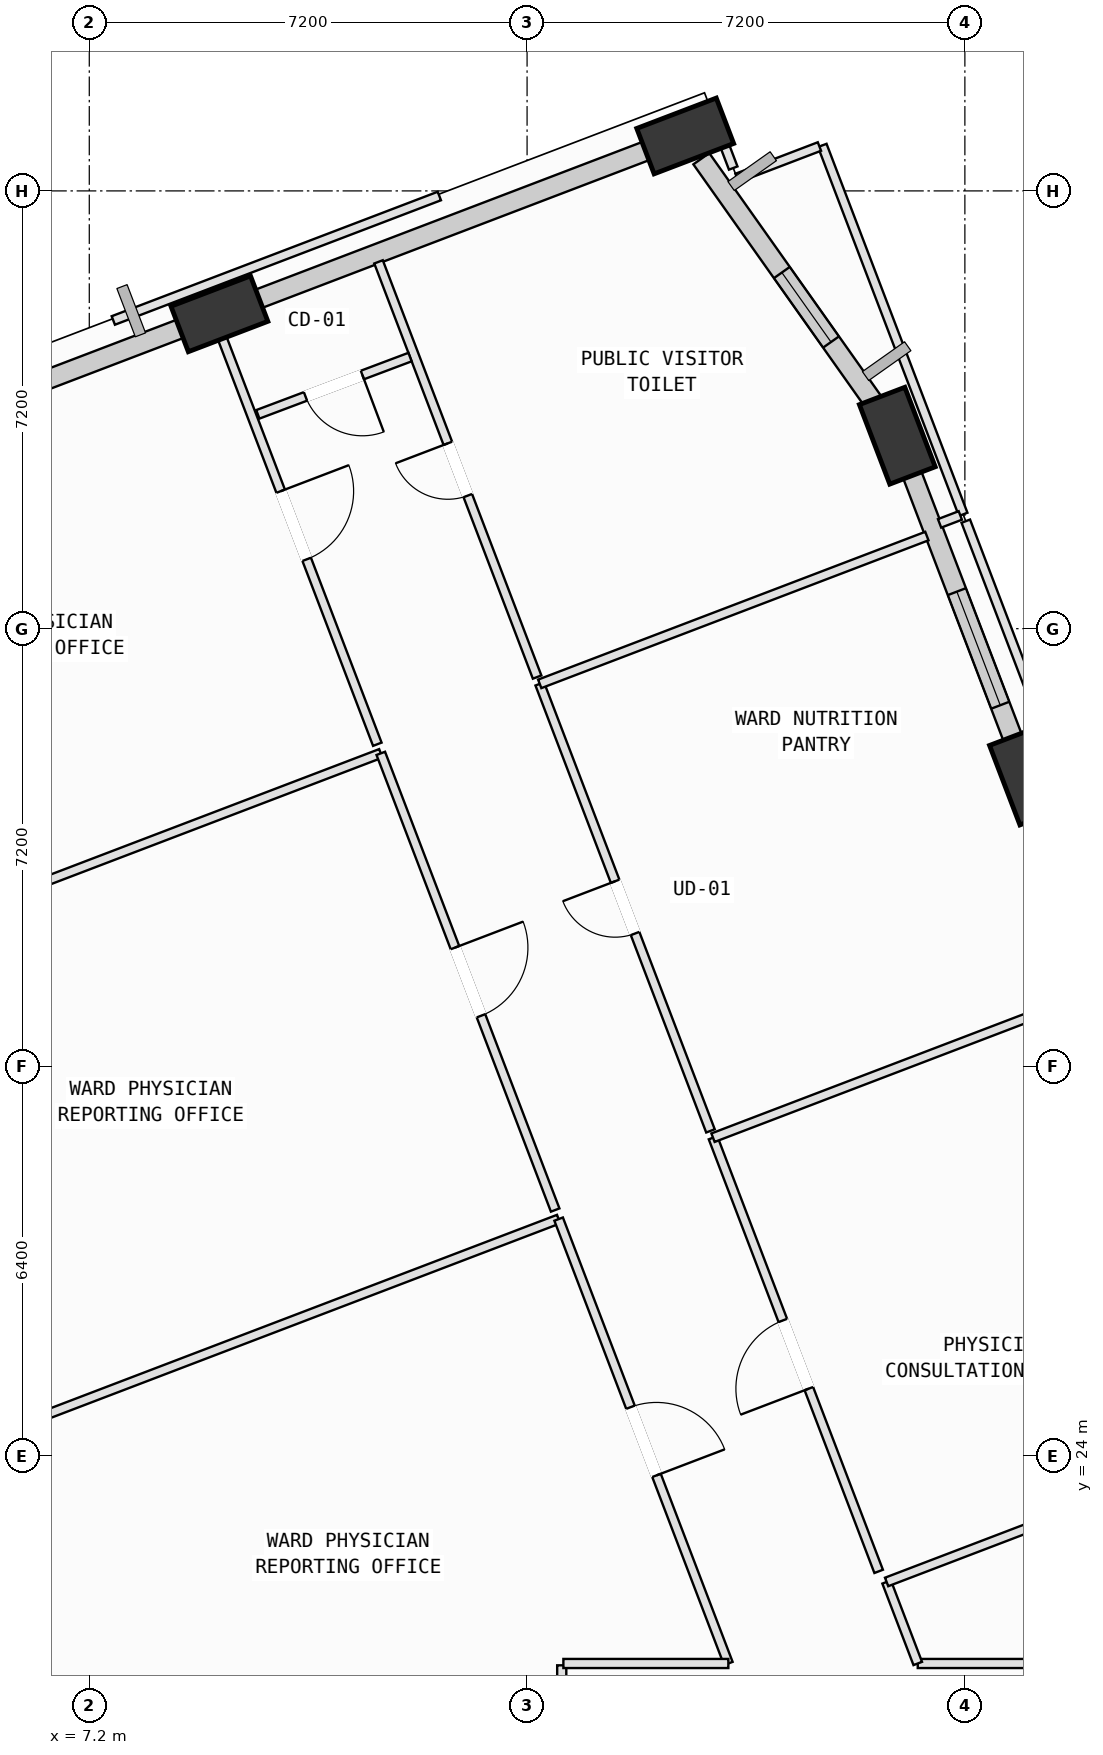
"""IFC4 building model, lengths in metres.
Left out: names, types, materials, properties, quantities, classifications, styles, units other than length and angle.
Written with IfcOpenShell. Run it as: python <this file> out.ifc"""

import sys

from ifc_helpers import new_model, si_unit, direction, frame, frame_2d, origin, origin_2d, place, context, subcontext, project, spatial, rectangle, extrude, element, fill, save


model = new_model("IFC4")
c1 = context("Model", 3, precision=1e-05, world=origin(), true_north=direction((0.0, 1.0)))
c2 = subcontext(c1, "Body", "Model", "MODEL_VIEW")
j1 = project(units=[si_unit("LENGTHUNIT", "METRE"), si_unit("PLANEANGLEUNIT", "RADIAN")], contexts=[c1])
p1 = place(None, origin())
s1 = spatial("IfcSite", under=j1, at=p1, CompositionType="ELEMENT")
p2 = place(p1, origin())
s2 = spatial("IfcBuilding", under=s1, at=p2, CompositionType="ELEMENT")
p3 = place(p2, frame((0.0, 0.0, 112.4)))
s3 = spatial("IfcBuildingStorey", under=s2, at=p3, CompositionType="ELEMENT", Elevation=112.4)
p4 = place(p3, frame((22.629, 35.168, 0.002), z_axis=(-0.042497434841, -0.045728947103, 0.998049513516), x_axis=(0.373403967299, 0.925833824237, 0.058319868861)))
e1 = element("IfcColumn", 1, at=p4, inside=s3, PredefinedType="COLUMN", context=c2, shape_type="SweptSolid", body=[
    extrude(rectangle(XDim=1.4, YDim=0.8, at=origin_2d()), origin(), (0.0, 0.0, 1.0), 4.004),
])
p5 = place(p3, frame((20.489, 40.774, 0.002), z_axis=(-0.065494174518, -0.054720504546, 0.996351433725), x_axis=(0.485566626564, 0.870556249889, 0.079729962663)))
e2 = element("IfcColumn", 2, at=p5, inside=s3, PredefinedType="COLUMN", context=c2, shape_type="SweptSolid", body=[
    extrude(rectangle(XDim=1.4, YDim=0.8, at=origin_2d()), origin(), (0.0, 0.0, 1.0), 4.011),
])
p6 = place(p3, frame((17.0, 45.704, 0.002), z_axis=(-0.08555522656, -0.06909996297, 0.993934353127), x_axis=(0.86282484586, -0.503978288116, 0.039232263177)))
e3 = element("IfcColumn", 3, at=p6, inside=s3, PredefinedType="COLUMN", context=c2, shape_type="SweptSolid", body=[
    extrude(rectangle(XDim=1.4, YDim=0.8, at=origin_2d()), origin(), (0.0, 0.0, 1.0), 4.021),
])
p7 = place(p3, frame((9.34, 42.778, 0.002), z_axis=(-0.07310555409, -0.100383745915, 0.992259382176), x_axis=(0.963553675807, -0.263821466154, 0.044300652763)))
e4 = element("IfcColumn", 4, at=p7, inside=s3, PredefinedType="COLUMN", context=c2, shape_type="SweptSolid", body=[
    extrude(rectangle(XDim=1.4, YDim=0.8, at=origin_2d()), origin(), (0.0, 0.0, 1.0), 4.028),
])
p8 = place(p3, frame((20.676, 40.284, 0.0), z_axis=(0.0, 0.0, 1.0), x_axis=(0.356741479656, -0.934203145302, 0.0)))
e5 = element("IfcWall", 5, at=p8, inside=s3, PredefinedType="SOLIDWALL", context=c2, shape_type="SweptSolid", body=[
    extrude(rectangle(XDim=5.047, YDim=0.32, at=frame_2d((2.523, 0.0))), origin(), (0.0, 0.0, 1.0), 3.165),
])
p9 = place(p8, frame((2.221, 0.0, 0.75)))
e6 = element("IfcOpeningElement", 6, at=p9, cuts=e5, PredefinedType="OPENING", context=c2, shape_type="SweptSolid", body=[
    extrude(rectangle(XDim=2.0, YDim=1.95, at=frame_2d((1.0, 0.975))), frame((0.0, 0.17, 0.0), z_axis=(0.0, -1.0, 0.0), x_axis=(1.0, 0.0, 0.0)), (0.0, 0.0, 1.0), 0.34),
])
p10 = place(p3, frame((17.265, 45.33, 0.0), z_axis=(0.0, 0.0, 1.0), x_axis=(0.577621035299, -0.816305053017, 0.0)))
e7 = element("IfcWall", 7, at=p10, inside=s3, PredefinedType="SOLIDWALL", context=c2, shape_type="SweptSolid", body=[
    extrude(rectangle(XDim=5.129, YDim=0.32, at=frame_2d((2.564, 0.0))), origin(), (0.0, 0.0, 1.0), 3.165),
])
p11 = place(p10, frame((2.293, 0.0, 0.75)))
e8 = element("IfcOpeningElement", 8, at=p11, cuts=e7, PredefinedType="OPENING", context=c2, shape_type="SweptSolid", body=[
    extrude(rectangle(XDim=1.4, YDim=1.85, at=frame_2d((0.7, 0.925))), frame((0.0, 0.17, 0.0), z_axis=(0.0, -1.0, 0.0), x_axis=(1.0, 0.0, 0.0)), (0.0, 0.0, 1.0), 0.34),
])
p12 = place(p3, frame((9.59, 42.874, 0.0), z_axis=(0.0, 0.0, 1.0), x_axis=(0.934201815153, 0.356744962915, 0.0)))
e9 = element("IfcWall", 9, at=p12, inside=s3, PredefinedType="SOLIDWALL", context=c2, shape_type="SweptSolid", body=[
    extrude(rectangle(XDim=7.231, YDim=0.32, at=frame_2d((3.615, 0.0))), origin(), (0.0, 0.0, 1.0), 3.165),
])
p13 = place(p3, frame((1.906, 39.94, 0.0), z_axis=(0.0, 0.0, 1.0), x_axis=(0.934209230199, 0.356725544658, 0.0)))
e10 = element("IfcWall", 10, at=p13, inside=s3, PredefinedType="SOLIDWALL", context=c2, shape_type="SweptSolid", body=[
    extrude(rectangle(XDim=7.27, YDim=0.32, at=frame_2d((3.635, 0.0))), origin(), (0.0, 0.0, 1.0), 3.165),
])
p14 = place(p3, frame((7.165, 17.08, 0.0), z_axis=(0.0, 0.0, 1.0), x_axis=(-0.356759039151, 0.934196439719, 0.0)))
e11 = element("IfcWall", 11, at=p14, inside=s3, PredefinedType="SOLIDWALL", context=c2, shape_type="SweptSolid", body=[
    extrude(rectangle(XDim=5.662, YDim=0.32, at=frame_2d((2.831, 0.0))), origin(), (0.0, 0.0, 1.0), 3.165),
])
p15 = place(p14, frame((1.93, 0.0, 0.75)))
e12 = element("IfcOpeningElement", 12, at=p15, cuts=e11, PredefinedType="OPENING", context=c2, shape_type="SweptSolid", body=[
    extrude(rectangle(XDim=1.8, YDim=2.05, at=frame_2d((0.9, 1.025))), frame((0.0, 0.17, 0.0), z_axis=(0.0, -1.0, 0.0), x_axis=(1.0, 0.0, 0.0)), (0.0, 0.0, 1.0), 0.34),
])
p16 = place(p3, frame((14.97, 20.55, 0.0), z_axis=(0.0, 0.0, 1.0), x_axis=(0.0, -1.0, 0.0)))
e13 = element("IfcWall", 13, at=p16, inside=s3, PredefinedType="PARTITIONING", context=c2, shape_type="SweptSolid", body=[
    extrude(rectangle(XDim=1.248, YDim=0.15, at=frame_2d((0.624, 0.0))), origin(), (0.0, 0.0, 1.0), 3.78),
])
p17 = place(p3, frame((4.675, 23.977, 0.0), z_axis=(0.0, 0.0, 1.0), x_axis=(0.934201387947, 0.356746081629, 0.0)))
e14 = element("IfcWall", 14, at=p17, inside=s3, PredefinedType="PARTITIONING", context=c2, shape_type="SweptSolid", body=[
    extrude(rectangle(XDim=10.965, YDim=0.15, at=frame_2d((5.483, 0.0))), origin(), (0.0, 0.0, 1.0), 3.78),
])
p18 = place(p3, frame((14.919, 27.889, 0.0), z_axis=(0.0, 0.0, 1.0), x_axis=(0.356742665593, -0.934202692431, 0.0)))
e15 = element("IfcWall", 15, at=p18, inside=s3, PredefinedType="PARTITIONING", context=c2, shape_type="SweptSolid", body=[
    extrude(rectangle(XDim=7.824, YDim=0.15, at=frame_2d((3.912, 0.0))), origin(), (0.0, 0.0, 1.0), 3.78),
])
p19 = place(p18, frame((3.312, 0.0, 0.0)))
e16 = element("IfcOpeningElement", 16, at=p19, cuts=e15, PredefinedType="OPENING", context=c2, shape_type="SweptSolid", body=[
    extrude(rectangle(XDim=1.2, YDim=2.15, at=frame_2d((0.6, 1.075))), frame((0.0, 0.085, 0.0), z_axis=(0.0, -1.0, 0.0), x_axis=(1.0, 0.0, 0.0)), (0.0, 0.0, 1.0), 0.17),
])
p20 = place(p3, frame((17.71, 20.58, 0.0), z_axis=(0.0, 0.0, 1.0), x_axis=(-1.0, 0.0, 0.0)))
e17 = element("IfcWall", 17, at=p20, inside=s3, PredefinedType="PARTITIONING", context=c2, shape_type="SweptSolid", body=[
    extrude(rectangle(XDim=2.713, YDim=0.15, at=frame_2d((1.356, 0.0))), origin(), (0.0, 0.0, 1.0), 3.78),
])
p21 = place(p3, frame((1.75, 31.638, 0.0), z_axis=(0.0, 0.0, 1.0), x_axis=(0.934223647232, 0.356687786379, 0.0)))
e18 = element("IfcWall", 18, at=p21, inside=s3, PredefinedType="PARTITIONING", context=c2, shape_type="SweptSolid", body=[
    extrude(rectangle(XDim=10.965, YDim=0.15, at=frame_2d((5.482, 0.0))), origin(), (0.0, 0.0, 1.0), 3.78),
])
p22 = place(p3, frame((11.994, 35.549, 0.0), z_axis=(0.0, 0.0, 1.0), x_axis=(0.356737704726, -0.934204586815, 0.0)))
e19 = element("IfcWall", 19, at=p22, inside=s3, PredefinedType="PARTITIONING", context=c2, shape_type="SweptSolid", body=[
    extrude(rectangle(XDim=8.04, YDim=0.15, at=frame_2d((4.02, 0.0))), origin(), (0.0, 0.0, 1.0), 3.78),
])
p23 = place(p22, frame((3.42, 0.0, 0.0)))
e20 = element("IfcOpeningElement", 20, at=p23, cuts=e19, PredefinedType="OPENING", context=c2, shape_type="SweptSolid", body=[
    extrude(rectangle(XDim=1.2, YDim=2.15, at=frame_2d((0.6, 1.075))), frame((0.0, 0.085, 0.0), z_axis=(0.0, -1.0, 0.0), x_axis=(1.0, 0.0, 0.0)), (0.0, 0.0, 1.0), 0.17),
])
p24 = place(p3, frame((8.638, 42.693, 0.0), z_axis=(0.0, 0.0, 1.0), x_axis=(0.934382200131, 0.356272233101, 0.0)))
e21 = element("IfcWall", 21, at=p24, inside=s3, PredefinedType="PARTITIONING", context=c2, shape_type="SweptSolid", body=[
    extrude(rectangle(XDim=0.587, YDim=0.15, at=frame_2d((0.293, 0.0))), origin(), (0.0, 0.0, 1.0), 3.78),
])
p25 = place(p3, frame((9.186, 42.902, 0.0), z_axis=(0.0, 0.0, 1.0), x_axis=(0.356779945652, -0.934188455495, 0.0)))
e22 = element("IfcWall", 22, at=p25, inside=s3, PredefinedType="PARTITIONING", context=c2, shape_type="SweptSolid", body=[
    extrude(rectangle(XDim=7.71, YDim=0.15, at=frame_2d((3.855, 0.0))), origin(), (0.0, 0.0, 1.0), 2.965),
])
p26 = place(p25, frame((3.255, 0.0, 0.0)))
e23 = element("IfcOpeningElement", 23, at=p26, cuts=e22, PredefinedType="OPENING", context=c2, shape_type="SweptSolid", body=[
    extrude(rectangle(XDim=1.2, YDim=2.15, at=frame_2d((0.6, 1.075))), frame((0.0, 0.085, 0.0), z_axis=(0.0, -1.0, 0.0), x_axis=(1.0, 0.0, 0.0)), (0.0, 0.0, 1.0), 0.17),
])
p27 = place(p3, frame((27.377, 20.58, 0.0), z_axis=(0.0, 0.0, 1.0), x_axis=(-1.0, 0.0, 0.0)))
e24 = element("IfcWall", 24, at=p27, inside=s3, PredefinedType="PARTITIONING", context=c2, shape_type="SweptSolid", body=[
    extrude(rectangle(XDim=6.552, YDim=0.15, at=frame_2d((3.276, 0.0))), origin(), (0.0, 0.0, 1.0), 3.78),
])
p28 = place(p27, frame((2.676, 0.0, 0.0)))
e25 = element("IfcOpeningElement", 25, at=p28, cuts=e24, PredefinedType="OPENING", context=c2, shape_type="SweptSolid", body=[
    extrude(rectangle(XDim=1.2, YDim=2.15, at=frame_2d((0.6, 1.075))), frame((0.0, 0.085, 0.0), z_axis=(0.0, -1.0, 0.0), x_axis=(1.0, 0.0, 0.0)), (0.0, 0.0, 1.0), 0.17),
])
p29 = place(p3, frame((20.825, 20.58, 0.0), z_axis=(0.0, 0.0, 1.0), x_axis=(-0.356709663508, 0.934215294223, 0.0)))
e26 = element("IfcWall", 26, at=p29, inside=s3, PredefinedType="PARTITIONING", context=c2, shape_type="SweptSolid", body=[
    extrude(rectangle(XDim=1.435, YDim=0.15, at=frame_2d((0.718, 0.0))), origin(), (0.0, 0.0, 1.0), 3.78),
])
p30 = place(p3, frame((20.313, 21.921, 0.0), z_axis=(0.0, 0.0, 1.0), x_axis=(0.93417589532, 0.356812831332, 0.0)))
e27 = element("IfcWall", 27, at=p30, inside=s3, PredefinedType="PARTITIONING", context=c2, shape_type="SweptSolid", body=[
    extrude(rectangle(XDim=6.755, YDim=0.15, at=frame_2d((3.377, 0.0))), origin(), (0.0, 0.0, 1.0), 3.78),
])
p31 = place(p3, frame((20.182, 22.095, 0.0), z_axis=(0.0, 0.0, 1.0), x_axis=(-0.356741141549, 0.934203274414, 0.0)))
e28 = element("IfcWall", 28, at=p31, inside=s3, PredefinedType="PARTITIONING", context=c2, shape_type="SweptSolid", body=[
    extrude(rectangle(XDim=7.635, YDim=0.15, at=frame_2d((3.818, 0.0))), origin(), (0.0, 0.0, 1.0), 3.78),
])
p32 = place(p31, frame((3.218, 0.0, 0.0)))
e29 = element("IfcOpeningElement", 29, at=p32, cuts=e28, PredefinedType="OPENING", context=c2, shape_type="SweptSolid", body=[
    extrude(rectangle(XDim=1.2, YDim=2.15, at=frame_2d((0.6, 1.075))), frame((0.0, 0.085, 0.0), z_axis=(0.0, -1.0, 0.0), x_axis=(1.0, 0.0, 0.0)), (0.0, 0.0, 1.0), 0.17),
])
p33 = place(p3, frame((17.458, 29.228, 0.0), z_axis=(0.0, 0.0, 1.0), x_axis=(0.934175840808, 0.356812974051, 0.0)))
e30 = element("IfcWall", 30, at=p33, inside=s3, PredefinedType="PARTITIONING", context=c2, shape_type="SweptSolid", body=[
    extrude(rectangle(XDim=6.816, YDim=0.15, at=frame_2d((3.408, 0.0))), origin(), (0.0, 0.0, 1.0), 3.78),
])
p34 = place(p3, frame((17.416, 29.34, 0.0), z_axis=(0.0, 0.0, 1.0), x_axis=(-0.356818232032, 0.93417383248, 0.0)))
e31 = element("IfcWall", 31, at=p34, inside=s3, PredefinedType="PARTITIONING", context=c2, shape_type="SweptSolid", body=[
    extrude(rectangle(XDim=7.87, YDim=0.15, at=frame_2d((3.935, 0.0))), origin(), (0.0, 0.0, 1.0), 3.78),
])
p35 = place(p34, frame((3.475, 0.0, 0.0)))
e32 = element("IfcOpeningElement", 32, at=p35, cuts=e31, PredefinedType="OPENING", context=c2, shape_type="SweptSolid", body=[
    extrude(rectangle(XDim=0.92, YDim=2.1, at=frame_2d((0.46, 1.05))), frame((0.0, 0.085, 0.0), z_axis=(0.0, -1.0, 0.0), x_axis=(1.0, 0.0, 0.0)), (0.0, 0.0, 1.0), 0.17),
])
p36 = place(p3, frame((14.608, 36.692, 0.0), z_axis=(0.0, 0.0, 1.0), x_axis=(0.934216215808, 0.356707249886, 0.0)))
e33 = element("IfcWall", 33, at=p36, inside=s3, PredefinedType="PARTITIONING", context=c2, shape_type="SweptSolid", body=[
    extrude(rectangle(XDim=6.815, YDim=0.15, at=frame_2d((3.408, 0.0))), origin(), (0.0, 0.0, 1.0), 3.78),
])
p37 = place(p3, frame((21.615, 39.368, 0.0), z_axis=(0.0, 0.0, 1.0), x_axis=(0.356709934664, -0.934215190688, 0.0)))
e34 = element("IfcWall", 34, at=p37, inside=s3, PredefinedType="PARTITIONING", context=c2, shape_type="SweptSolid", body=[
    extrude(rectangle(XDim=7.869, YDim=0.15, at=frame_2d((3.935, 0.0))), origin(), (0.0, 0.0, 1.0), 3.78),
])
p38 = place(p3, frame((19.255, 45.548, 0.0), z_axis=(0.0, 0.0, 1.0), x_axis=(0.356731387225, -0.934206999208, 0.0)))
e35 = element("IfcWall", 35, at=p38, inside=s3, PredefinedType="PARTITIONING", context=c2, shape_type="SweptSolid", body=[
    extrude(rectangle(XDim=6.495, YDim=0.15, at=frame_2d((3.248, 0.0))), origin(), (0.0, 0.0, 1.0), 3.78),
])
p39 = place(p3, frame((21.525, 39.462, 0.0), z_axis=(0.0, 0.0, 1.0), x_axis=(-0.934445312554, -0.356106666389, 0.0)))
e36 = element("IfcWall", 36, at=p39, inside=s3, PredefinedType="PARTITIONING", context=c2, shape_type="SweptSolid", body=[
    extrude(rectangle(XDim=0.365, YDim=0.15, at=frame_2d((0.182, 0.0))), origin(), (0.0, 0.0, 1.0), 3.78),
])
p40 = place(p3, frame((14.565, 36.804, 0.0), z_axis=(0.0, 0.0, 1.0), x_axis=(-0.356753501963, 0.93419855429, 0.0)))
e37 = element("IfcWall", 37, at=p40, inside=s3, PredefinedType="PARTITIONING", context=c2, shape_type="SweptSolid", body=[
    extrude(rectangle(XDim=7.31, YDim=0.15, at=frame_2d((3.655, 0.0))), origin(), (0.0, 0.0, 1.0), 3.78),
])
p41 = place(p40, frame((3.195, 0.0, 0.0)))
e38 = element("IfcOpeningElement", 38, at=p41, cuts=e37, PredefinedType="OPENING", context=c2, shape_type="SweptSolid", body=[
    extrude(rectangle(XDim=0.92, YDim=2.1, at=frame_2d((0.46, 1.05))), frame((0.0, 0.085, 0.0), z_axis=(0.0, -1.0, 0.0), x_axis=(1.0, 0.0, 0.0)), (0.0, 0.0, 1.0), 0.17),
])
p42 = place(p3, frame((16.277, 45.631, 0.0), z_axis=(0.0, 0.0, 1.0), x_axis=(0.934456839765, 0.356076416822, 0.0)))
e39 = element("IfcWall", 39, at=p42, inside=s3, PredefinedType="PARTITIONING", context=c2, shape_type="SweptSolid", body=[
    extrude(rectangle(XDim=1.252, YDim=0.15, at=frame_2d((0.626, 0.0))), origin(), (0.0, 0.0, 1.0), 3.165),
])
p43 = place(p3, frame((17.465, 46.03, 0.0), z_axis=(0.0, 0.0, 1.0), x_axis=(0.355628642723, -0.934627342033, 0.0)))
e40 = element("IfcWall", 40, at=p43, inside=s3, PredefinedType="PARTITIONING", context=c2, shape_type="SweptSolid", body=[
    extrude(rectangle(XDim=0.914, YDim=0.15, at=frame_2d((0.457, 0.0))), origin(), (0.0, 0.0, 1.0), 3.78),
])
p44 = place(p3, frame((17.853, 45.012, 0.0), z_axis=(0.0, 0.0, 1.0), x_axis=(0.934055137267, 0.35712882906, 0.0)))
e41 = element("IfcWall", 41, at=p44, inside=s3, PredefinedType="PARTITIONING", context=c2, shape_type="SweptSolid", body=[
    extrude(rectangle(XDim=1.451, YDim=0.15, at=frame_2d((0.725, 0.0))), origin(), (0.0, 0.0, 1.0), 3.78),
])
p45 = place(p3, frame((12.475, 42.067, 0.0), z_axis=(0.0, 0.0, 1.0), x_axis=(-0.93593469175, -0.352173611701, 0.0)))
e42 = element("IfcWall", 42, at=p45, inside=s3, PredefinedType="PARTITIONING", context=c2, shape_type="SweptSolid", body=[
    extrude(rectangle(XDim=2.675, YDim=0.15, at=frame_2d((1.337, 0.0))), origin(), (0.0, 0.0, 1.0), 3.78),
])
p46 = place(p45, frame((0.837, 0.0, 0.0)))
e43 = element("IfcOpeningElement", 43, at=p46, cuts=e42, PredefinedType="OPENING", context=c2, shape_type="SweptSolid", body=[
    extrude(rectangle(XDim=1.0, YDim=2.12, at=frame_2d((0.5, 1.06))), frame((0.0, 0.085, 0.0), z_axis=(0.0, -1.0, 0.0), x_axis=(1.0, 0.0, 0.0)), (0.0, 0.0, 1.0), 0.17),
])
p47 = place(p3, frame((7.595, 42.669, 0.0), z_axis=(0.0, 0.0, 1.0), x_axis=(0.934230756323, 0.35666916595, 0.0)))
e44 = element("IfcWall", 44, at=p47, inside=s3, PredefinedType="PARTITIONING", context=c2, shape_type="SweptSolid", body=[
    extrude(rectangle(XDim=5.74, YDim=0.15, at=frame_2d((2.87, 0.0))), origin(), (0.0, 0.0, 1.0), 3.78),
])
p48 = place(p9, origin())
e45 = element("IfcWindow", 45, at=p48, inside=s3, PartitioningType="SINGLE_PANEL", PredefinedType="WINDOW", context=c2, shape_type="SweptSolid", body=[
    extrude(rectangle(XDim=2.0, YDim=1.95, at=frame_2d((1.0, 0.975))), frame((0.0, 0.03, 0.0), z_axis=(0.0, -1.0, 0.0), x_axis=(1.0, 0.0, 0.0)), (0.0, 0.0, 1.0), 0.06),
])
fill(e6, e45)
p49 = place(p11, origin())
e46 = element("IfcWindow", 46, at=p49, inside=s3, PartitioningType="SINGLE_PANEL", PredefinedType="WINDOW", context=c2, shape_type="SweptSolid", body=[
    extrude(rectangle(XDim=1.4, YDim=1.85, at=frame_2d((0.7, 0.925))), frame((0.0, 0.03, 0.0), z_axis=(0.0, -1.0, 0.0), x_axis=(1.0, 0.0, 0.0)), (0.0, 0.0, 1.0), 0.06),
])
fill(e8, e46)
p50 = place(p19, origin())
e47 = element("IfcDoor", 47, at=p50, inside=s3, OperationType="SINGLE_SWING_RIGHT", PredefinedType="DOOR", context=c2, shape_type="SweptSolid", body=[
    extrude(rectangle(XDim=1.2, YDim=2.15, at=frame_2d((0.6, 1.075))), frame((0.0, 0.025, 0.0), z_axis=(0.0, -1.0, 0.0), x_axis=(1.0, 0.0, 0.0)), (0.0, 0.0, 1.0), 0.05),
])
fill(e16, e47)
p51 = place(p23, origin())
e48 = element("IfcDoor", 48, at=p51, inside=s3, OperationType="SINGLE_SWING_LEFT", PredefinedType="DOOR", context=c2, shape_type="SweptSolid", body=[
    extrude(rectangle(XDim=1.2, YDim=2.15, at=frame_2d((0.6, 1.075))), frame((0.0, 0.025, 0.0), z_axis=(0.0, -1.0, 0.0), x_axis=(1.0, 0.0, 0.0)), (0.0, 0.0, 1.0), 0.05),
])
fill(e20, e48)
p52 = place(p26, origin())
e49 = element("IfcDoor", 49, at=p52, inside=s3, OperationType="SINGLE_SWING_LEFT", PredefinedType="DOOR", context=c2, shape_type="SweptSolid", body=[
    extrude(rectangle(XDim=1.2, YDim=2.15, at=frame_2d((0.6, 1.075))), frame((0.0, 0.025, 0.0), z_axis=(0.0, -1.0, 0.0), x_axis=(1.0, 0.0, 0.0)), (0.0, 0.0, 1.0), 0.05),
])
fill(e23, e49)
p53 = place(p32, origin())
e50 = element("IfcDoor", 50, at=p53, inside=s3, OperationType="SINGLE_SWING_LEFT", PredefinedType="DOOR", context=c2, shape_type="SweptSolid", body=[
    extrude(rectangle(XDim=1.2, YDim=2.15, at=frame_2d((0.6, 1.075))), frame((0.0, 0.025, 0.0), z_axis=(0.0, -1.0, 0.0), x_axis=(1.0, 0.0, 0.0)), (0.0, 0.0, 1.0), 0.05),
])
fill(e29, e50)
p54 = place(p35, origin())
e51 = element("IfcDoor", 51, at=p54, inside=s3, OperationType="SINGLE_SWING_RIGHT", PredefinedType="DOOR", context=c2, shape_type="SweptSolid", body=[
    extrude(rectangle(XDim=0.92, YDim=2.1, at=frame_2d((0.46, 1.05))), frame((0.0, 0.025, 0.0), z_axis=(0.0, -1.0, 0.0), x_axis=(1.0, 0.0, 0.0)), (0.0, 0.0, 1.0), 0.05),
])
fill(e32, e51)
p55 = place(p41, origin())
e52 = element("IfcDoor", 52, at=p55, inside=s3, OperationType="SINGLE_SWING_RIGHT", PredefinedType="DOOR", context=c2, shape_type="SweptSolid", body=[
    extrude(rectangle(XDim=0.92, YDim=2.1, at=frame_2d((0.46, 1.05))), frame((0.0, 0.025, 0.0), z_axis=(0.0, -1.0, 0.0), x_axis=(1.0, 0.0, 0.0)), (0.0, 0.0, 1.0), 0.05),
])
fill(e38, e52)
p56 = place(p46, origin())
e53 = element("IfcDoor", 53, at=p56, inside=s3, OperationType="SINGLE_SWING_LEFT", PredefinedType="DOOR", context=c2, shape_type="SweptSolid", body=[
    extrude(rectangle(XDim=1.0, YDim=2.12, at=frame_2d((0.5, 1.06))), frame((0.0, 0.025, 0.0), z_axis=(0.0, -1.0, 0.0), x_axis=(1.0, 0.0, 0.0)), (0.0, 0.0, 1.0), 0.05),
])
fill(e43, e53)
save(model, sys.argv[1])
